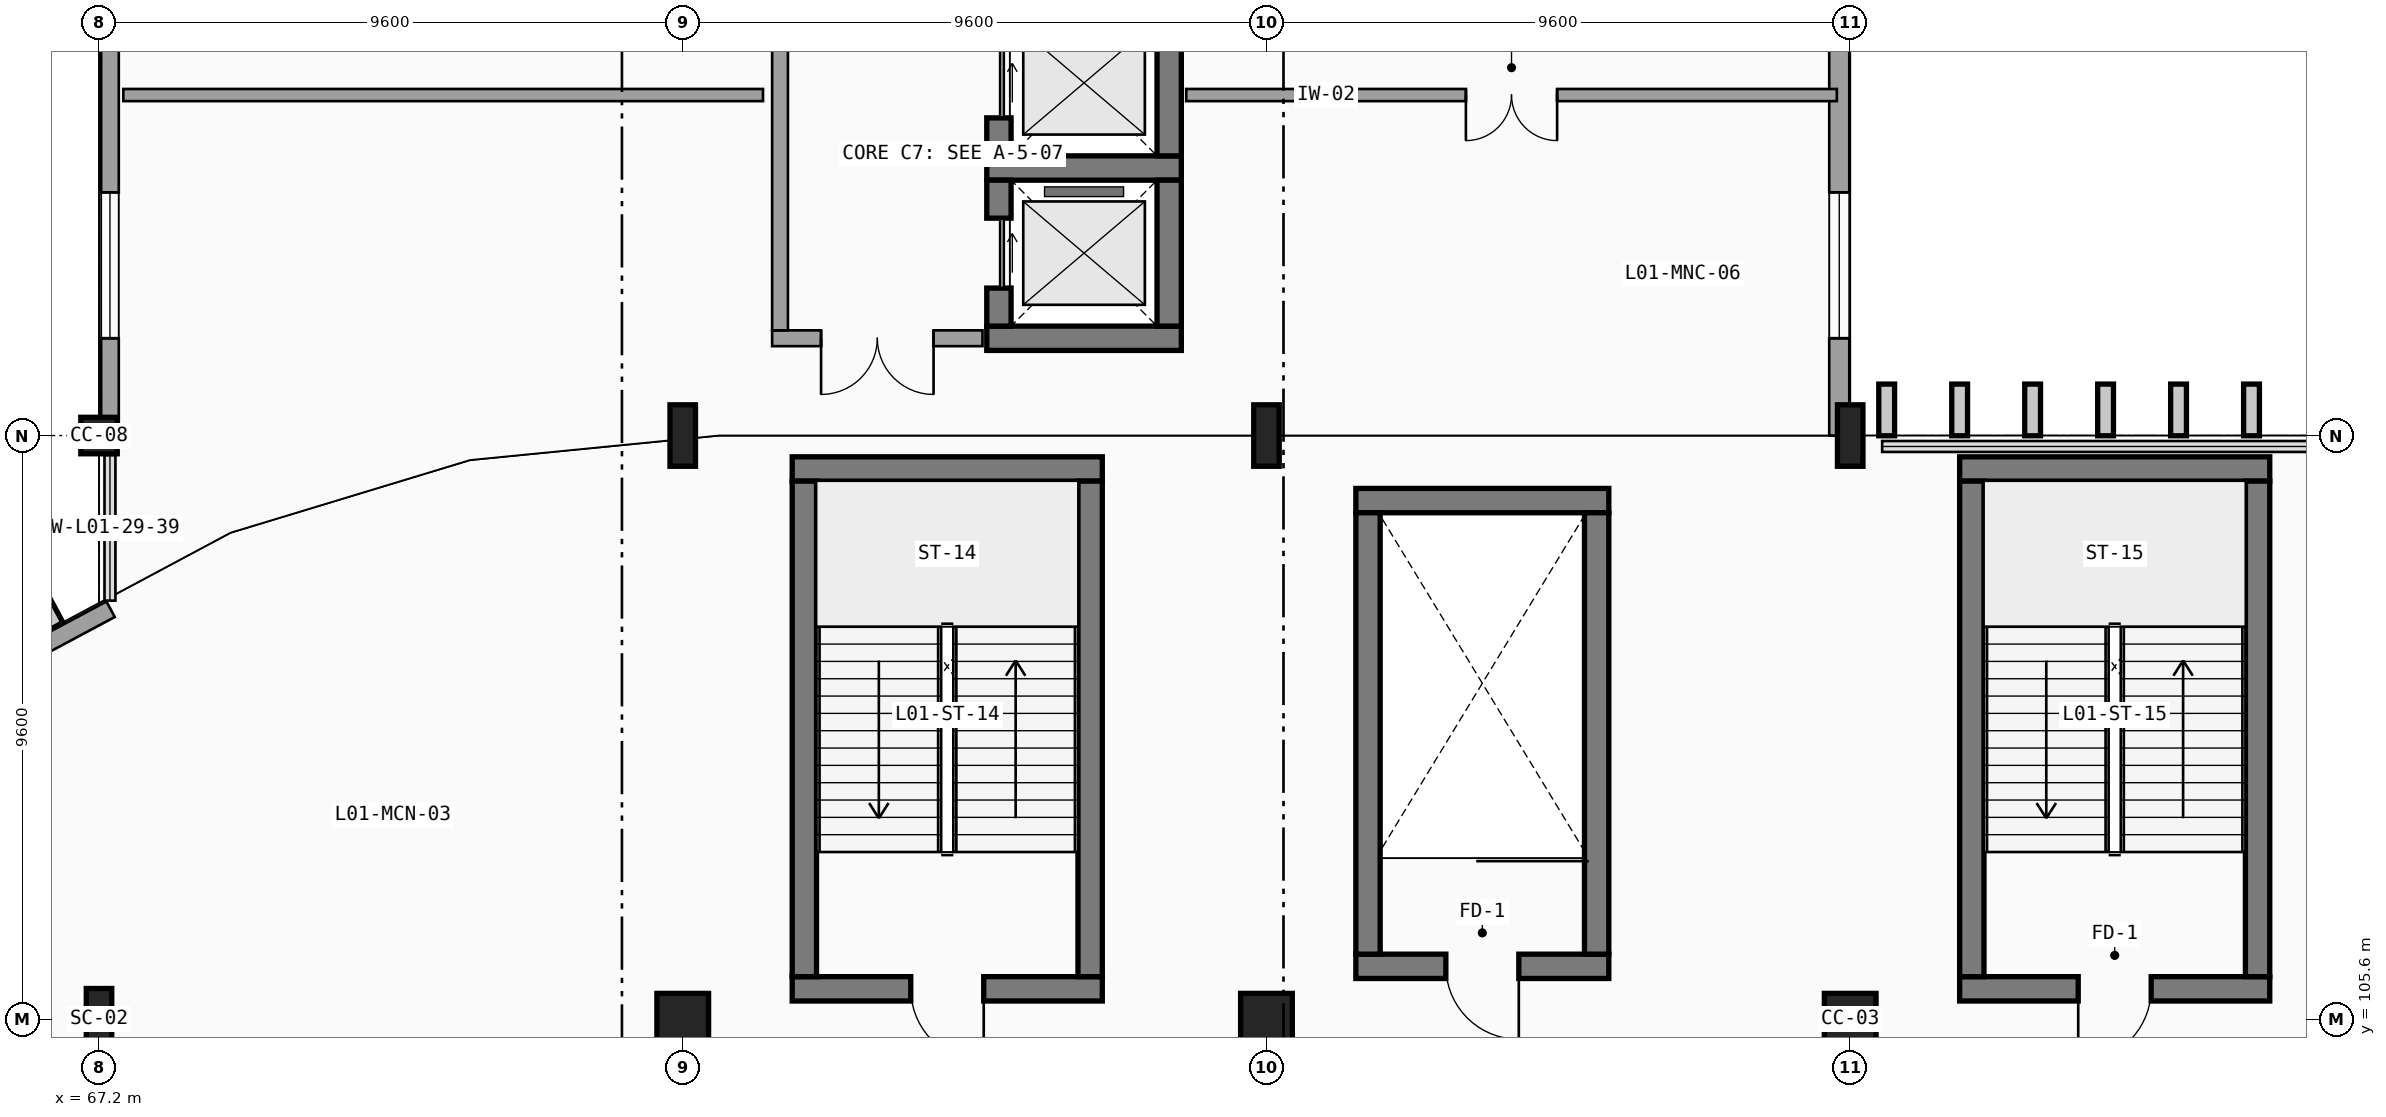
"""IFC4 building model, lengths in metres.
Left out: names, types, materials, properties, quantities, classifications, styles, units other than length and angle.
Written with IfcOpenShell. Run it as: python <this file> out.ifc"""

import sys

from ifc_helpers import new_model, si_unit, direction, frame, frame_2d, origin, origin_2d, place, context, subcontext, project, spatial, rectangle, i_section, extrude, element, fill, save


model = new_model("IFC4")
c1 = context("Model", 3, precision=1e-05, world=origin(), true_north=direction((0.0, 1.0)))
c2 = subcontext(c1, "Body", "Model", "MODEL_VIEW")
j1 = project(units=[si_unit("LENGTHUNIT", "METRE"), si_unit("PLANEANGLEUNIT", "RADIAN")], contexts=[c1])
p1 = place(None, origin())
s1 = spatial("IfcSite", under=j1, at=p1, CompositionType="ELEMENT")
p2 = place(p1, origin())
s2 = spatial("IfcBuilding", under=s1, at=p2, CompositionType="ELEMENT")
p3 = place(p2, frame((0.0, 0.0, 4.8)))
s3 = spatial("IfcBuildingStorey", under=s2, at=p3, CompositionType="ELEMENT", Elevation=4.8)
p4 = place(p3, frame((67.2, 105.6, 0.0), z_axis=(0.0, 0.0, 1.0), x_axis=(1.0, 0.0, 0.0)))
e1 = element("IfcColumn", 1, at=p4, inside=s3, PredefinedType="COLUMN", context=c2, shape_type="SweptSolid", body=[
    extrude(i_section(OverallWidth=0.419, OverallDepth=1.011, WebThickness=0.024, FlangeThickness=0.042, FilletRadius=0.031, at=origin_2d()), origin(), (0.0, 0.0, 1.0), 4.8),
])
p5 = place(p3, frame((67.2, 115.2, 0.0), z_axis=(0.0, 0.0, 1.0), x_axis=(1.0, 0.0, 0.0)))
e2 = element("IfcColumn", 2, at=p5, inside=s3, PredefinedType="COLUMN", context=c2, shape_type="SweptSolid", body=[
    extrude(rectangle(XDim=0.6, YDim=0.6, at=origin_2d()), origin(), (0.0, 0.0, 1.0), 4.8),
])
p6 = place(p3, frame((76.8, 105.6, 0.0), z_axis=(0.0, 0.0, 1.0), x_axis=(1.0, 0.0, 0.0)))
e3 = element("IfcColumn", 3, at=p6, inside=s3, PredefinedType="COLUMN", context=c2, shape_type="SweptSolid", body=[
    extrude(rectangle(XDim=0.85, YDim=0.85, at=origin_2d()), origin(), (0.0, 0.0, 1.0), 4.8),
])
p7 = place(p3, frame((76.8, 115.2, 0.0), z_axis=(0.0, 0.0, 1.0), x_axis=(1.0, 0.0, 0.0)))
e4 = element("IfcColumn", 4, at=p7, inside=s3, PredefinedType="COLUMN", context=c2, shape_type="SweptSolid", body=[
    extrude(i_section(OverallWidth=0.419, OverallDepth=1.011, WebThickness=0.024, FlangeThickness=0.042, FilletRadius=0.031, at=origin_2d()), origin(), (0.0, 0.0, 1.0), 4.8),
])
p8 = place(p3, frame((86.4, 105.6, 0.0), z_axis=(0.0, 0.0, 1.0), x_axis=(1.0, 0.0, 0.0)))
e5 = element("IfcColumn", 5, at=p8, inside=s3, PredefinedType="COLUMN", context=c2, shape_type="SweptSolid", body=[
    extrude(rectangle(XDim=0.85, YDim=0.85, at=origin_2d()), origin(), (0.0, 0.0, 1.0), 4.8),
])
p9 = place(p3, frame((86.4, 115.2, 0.0), z_axis=(0.0, 0.0, 1.0), x_axis=(1.0, 0.0, 0.0)))
e6 = element("IfcColumn", 6, at=p9, inside=s3, PredefinedType="COLUMN", context=c2, shape_type="SweptSolid", body=[
    extrude(i_section(OverallWidth=0.419, OverallDepth=1.011, WebThickness=0.024, FlangeThickness=0.042, FilletRadius=0.031, at=origin_2d()), origin(), (0.0, 0.0, 1.0), 4.8),
])
p10 = place(p3, frame((96.0, 105.6, 0.0), z_axis=(0.0, 0.0, 1.0), x_axis=(1.0, 0.0, 0.0)))
e7 = element("IfcColumn", 7, at=p10, inside=s3, PredefinedType="COLUMN", context=c2, shape_type="SweptSolid", body=[
    extrude(rectangle(XDim=0.85, YDim=0.85, at=origin_2d()), origin(), (0.0, 0.0, 1.0), 4.8),
])
p11 = place(p3, frame((96.0, 115.2, 0.0), z_axis=(0.0, 0.0, 1.0), x_axis=(1.0, 0.0, 0.0)))
e8 = element("IfcColumn", 8, at=p11, inside=s3, PredefinedType="COLUMN", context=c2, shape_type="SweptSolid", body=[
    extrude(i_section(OverallWidth=0.419, OverallDepth=1.011, WebThickness=0.024, FlangeThickness=0.042, FilletRadius=0.031, at=origin_2d()), origin(), (0.0, 0.0, 1.0), 4.8),
])
p12 = place(p3, frame((67.38, 124.8, 0.0), z_axis=(0.0, 0.0, 1.0), x_axis=(0.0, -1.0, 0.0)))
e9 = element("IfcWall", 9, at=p12, inside=s3, PredefinedType="SOLIDWALL", context=c2, shape_type="SweptSolid", body=[
    extrude(rectangle(XDim=9.6, YDim=0.29, at=frame_2d((4.8, 0.0))), origin(), (0.0, 0.0, 1.0), 3.913),
])
p13 = place(p12, frame((8.0, 0.0, 0.95), z_axis=(0.0, 0.0, 1.0), x_axis=(-1.0, 0.0, 0.0)))
e10 = element("IfcOpeningElement", 10, at=p13, cuts=e9, PredefinedType="OPENING", context=c2, shape_type="SweptSolid", body=[
    extrude(rectangle(XDim=2.4, YDim=2.2, at=frame_2d((1.2, 1.1))), frame((0.0, 0.155, 0.0), z_axis=(0.0, -1.0, 0.0), x_axis=(1.0, 0.0, 0.0)), (0.0, 0.0, 1.0), 0.31),
])
p14 = place(p3, frame((67.391, 112.343, 0.0), z_axis=(0.0, 0.0, 1.0), x_axis=(-0.881883861215, -0.47146670649, 0.0)))
e11 = element("IfcWall", 11, at=p14, inside=s3, PredefinedType="SOLIDWALL", context=c2, shape_type="SweptSolid", body=[
    extrude(rectangle(XDim=1.904, YDim=0.29, at=frame_2d((0.952, 0.0))), origin(), (0.0, 0.0, 1.0), 3.913),
])
p15 = place(p3, frame((95.82, 115.2, 0.0), z_axis=(0.0, 0.0, 1.0), x_axis=(0.0, 1.0, 0.0)))
e12 = element("IfcWall", 12, at=p15, inside=s3, PredefinedType="SOLIDWALL", context=c2, shape_type="SweptSolid", body=[
    extrude(rectangle(XDim=9.6, YDim=0.33, at=frame_2d((4.8, 0.0))), origin(), (0.0, 0.0, 1.0), 3.593),
])
p16 = place(p15, frame((4.0, 0.0, 0.95), z_axis=(0.0, 0.0, 1.0), x_axis=(-1.0, 0.0, 0.0)))
e13 = element("IfcOpeningElement", 13, at=p16, cuts=e12, PredefinedType="OPENING", context=c2, shape_type="SweptSolid", body=[
    extrude(rectangle(XDim=2.4, YDim=2.2, at=frame_2d((1.2, 1.1))), frame((0.0, 0.175, 0.0), z_axis=(0.0, -1.0, 0.0), x_axis=(1.0, 0.0, 0.0)), (0.0, 0.0, 1.0), 0.35),
])
for number, where, z_axis, x_axis in (
    (14, (81.8, 116.8, 0.0), (0.0, 0.0, 1.0), (1.0, 0.0, 0.0)),
    (15, (85.0, 119.6, 0.0), (0.0, 0.0, 1.0), (-1.0, 0.0, 0.0)),
):
    element("IfcWall", number, at=place(p3, frame(where, z_axis=z_axis, x_axis=x_axis)), inside=s3, PredefinedType="SHEAR", context=c2, shape_type="SweptSolid", body=[
        extrude(rectangle(XDim=3.2, YDim=0.4, at=frame_2d((1.6, 0.0))), origin(), (0.0, 0.0, 1.0), 4.52),
    ])
p17 = place(p3, frame((82.0, 119.4, 0.0), z_axis=(0.0, 0.0, 1.0), x_axis=(0.0, -1.0, 0.0)))
e16 = element("IfcWall", 16, at=p17, inside=s3, PredefinedType="SHEAR", context=c2, shape_type="SweptSolid", body=[
    extrude(rectangle(XDim=2.4, YDim=0.4, at=frame_2d((1.2, 0.0))), origin(), (0.0, 0.0, 1.0), 4.52),
])
p18 = place(p17, frame((0.625, 0.0, 0.0), z_axis=(0.0, 0.0, 1.0), x_axis=(1.0, 0.0, 0.0)))
e17 = element("IfcOpeningElement", 17, at=p18, cuts=e16, PredefinedType="OPENING", context=c2, shape_type="SweptSolid", body=[
    extrude(rectangle(XDim=1.15, YDim=2.2, at=frame_2d((0.575, 1.1))), frame((0.0, 0.21, 0.0), z_axis=(0.0, -1.0, 0.0), x_axis=(1.0, 0.0, 0.0)), (0.0, 0.0, 1.0), 0.42),
])
p19 = place(p3, frame((84.8, 117.0, 0.0), z_axis=(0.0, 0.0, 1.0), x_axis=(0.0, 1.0, 0.0)))
e18 = element("IfcWall", 18, at=p19, inside=s3, PredefinedType="SHEAR", context=c2, shape_type="SweptSolid", body=[
    extrude(rectangle(XDim=2.4, YDim=0.4, at=frame_2d((1.2, 0.0))), origin(), (0.0, 0.0, 1.0), 4.52),
])
p20 = place(p3, frame((82.0, 122.2, 0.0), z_axis=(0.0, 0.0, 1.0), x_axis=(0.0, -1.0, 0.0)))
e19 = element("IfcWall", 19, at=p20, inside=s3, PredefinedType="SHEAR", context=c2, shape_type="SweptSolid", body=[
    extrude(rectangle(XDim=2.4, YDim=0.4, at=frame_2d((1.2, 0.0))), origin(), (0.0, 0.0, 1.0), 4.52),
])
p21 = place(p20, frame((0.625, 0.0, 0.0), z_axis=(0.0, 0.0, 1.0), x_axis=(1.0, 0.0, 0.0)))
e20 = element("IfcOpeningElement", 20, at=p21, cuts=e19, PredefinedType="OPENING", context=c2, shape_type="SweptSolid", body=[
    extrude(rectangle(XDim=1.15, YDim=2.2, at=frame_2d((0.575, 1.1))), frame((0.0, 0.21, 0.0), z_axis=(0.0, -1.0, 0.0), x_axis=(1.0, 0.0, 0.0)), (0.0, 0.0, 1.0), 0.42),
])
p22 = place(p3, frame((84.8, 119.8, 0.0), z_axis=(0.0, 0.0, 1.0), x_axis=(0.0, 1.0, 0.0)))
e21 = element("IfcWall", 21, at=p22, inside=s3, PredefinedType="SHEAR", context=c2, shape_type="SweptSolid", body=[
    extrude(rectangle(XDim=2.4, YDim=0.4, at=frame_2d((1.2, 0.0))), origin(), (0.0, 0.0, 1.0), 4.52),
])
p23 = place(p3, frame((78.27, 116.8, 0.0), z_axis=(0.0, 0.0, 1.0), x_axis=(1.0, 0.0, 0.0)))
e22 = element("IfcWall", 22, at=p23, inside=s3, PredefinedType="SOLIDWALL", context=c2, shape_type="SweptSolid", body=[
    extrude(rectangle(XDim=3.46, YDim=0.26, at=frame_2d((1.73, 0.0))), origin(), (0.0, 0.0, 1.0), 4.52),
])
p24 = place(p23, frame((2.655, 0.0, 0.0), z_axis=(0.0, 0.0, 1.0), x_axis=(-1.0, 0.0, 0.0)))
e23 = element("IfcOpeningElement", 23, at=p24, cuts=e22, PredefinedType="OPENING", context=c2, shape_type="SweptSolid", body=[
    extrude(rectangle(XDim=1.85, YDim=2.25, at=frame_2d((0.925, 1.125))), frame((0.0, 0.14, 0.0), z_axis=(0.0, -1.0, 0.0), x_axis=(1.0, 0.0, 0.0)), (0.0, 0.0, 1.0), 0.28),
])
p25 = place(p3, frame((78.4, 122.27, 0.0), z_axis=(0.0, 0.0, 1.0), x_axis=(0.0, -1.0, 0.0)))
e24 = element("IfcWall", 24, at=p25, inside=s3, PredefinedType="SOLIDWALL", context=c2, shape_type="SweptSolid", body=[
    extrude(rectangle(XDim=5.34, YDim=0.26, at=frame_2d((2.67, 0.0))), origin(), (0.0, 0.0, 1.0), 4.52),
])
p26 = place(p3, frame((78.6, 106.1, 0.0), z_axis=(0.0, 0.0, 1.0), x_axis=(1.0, 0.0, 0.0)))
e25 = element("IfcWall", 25, at=p26, inside=s3, PredefinedType="SHEAR", context=c2, shape_type="SweptSolid", body=[
    extrude(rectangle(XDim=5.1, YDim=0.4, at=frame_2d((2.55, 0.0))), origin(), (0.0, 0.0, 1.0), 4.52),
])
p27 = place(p26, frame((3.15, 0.0, 0.0), z_axis=(0.0, 0.0, 1.0), x_axis=(-1.0, 0.0, 0.0)))
e26 = element("IfcOpeningElement", 26, at=p27, cuts=e25, PredefinedType="OPENING", context=c2, shape_type="SweptSolid", body=[
    extrude(rectangle(XDim=1.2, YDim=2.2, at=frame_2d((0.6, 1.1))), frame((0.0, 0.21, 0.0), z_axis=(0.0, -1.0, 0.0), x_axis=(1.0, 0.0, 0.0)), (0.0, 0.0, 1.0), 0.42),
])
p28 = place(p3, frame((83.7, 114.65, 0.0), z_axis=(0.0, 0.0, 1.0), x_axis=(-1.0, 0.0, 0.0)))
e27 = element("IfcWall", 27, at=p28, inside=s3, PredefinedType="SHEAR", context=c2, shape_type="SweptSolid", body=[
    extrude(rectangle(XDim=5.1, YDim=0.4, at=frame_2d((2.55, 0.0))), origin(), (0.0, 0.0, 1.0), 4.52),
])
for number, where, z_axis, x_axis in (
    (28, (78.8, 114.45, 0.0), (0.0, 0.0, 1.0), (0.0, -1.0, 0.0)),
    (29, (83.5, 106.3, 0.0), (0.0, 0.0, 1.0), (0.0, 1.0, 0.0)),
):
    element("IfcWall", number, at=place(p3, frame(where, z_axis=z_axis, x_axis=x_axis)), inside=s3, PredefinedType="SHEAR", context=c2, shape_type="SweptSolid", body=[
        extrude(rectangle(XDim=8.15, YDim=0.4, at=frame_2d((4.075, 0.0))), origin(), (0.0, 0.0, 1.0), 4.52),
    ])
p29 = place(p3, frame((97.8, 106.1, 0.0), z_axis=(0.0, 0.0, 1.0), x_axis=(1.0, 0.0, 0.0)))
e30 = element("IfcWall", 30, at=p29, inside=s3, PredefinedType="SHEAR", context=c2, shape_type="SweptSolid", body=[
    extrude(rectangle(XDim=5.1, YDim=0.4, at=frame_2d((2.55, 0.0))), origin(), (0.0, 0.0, 1.0), 4.52),
])
p30 = place(p29, frame((3.15, 0.0, 0.0), z_axis=(0.0, 0.0, 1.0), x_axis=(-1.0, 0.0, 0.0)))
e31 = element("IfcOpeningElement", 31, at=p30, cuts=e30, PredefinedType="OPENING", context=c2, shape_type="SweptSolid", body=[
    extrude(rectangle(XDim=1.2, YDim=2.2, at=frame_2d((0.6, 1.1))), frame((0.0, 0.21, 0.0), z_axis=(0.0, -1.0, 0.0), x_axis=(1.0, 0.0, 0.0)), (0.0, 0.0, 1.0), 0.42),
])
p31 = place(p3, frame((102.9, 114.65, 0.0), z_axis=(0.0, 0.0, 1.0), x_axis=(-1.0, 0.0, 0.0)))
e32 = element("IfcWall", 32, at=p31, inside=s3, PredefinedType="SHEAR", context=c2, shape_type="SweptSolid", body=[
    extrude(rectangle(XDim=5.1, YDim=0.4, at=frame_2d((2.55, 0.0))), origin(), (0.0, 0.0, 1.0), 4.52),
])
for number, where, z_axis, x_axis in (
    (33, (98.0, 114.45, 0.0), (0.0, 0.0, 1.0), (0.0, -1.0, 0.0)),
    (34, (102.7, 106.3, 0.0), (0.0, 0.0, 1.0), (0.0, 1.0, 0.0)),
):
    element("IfcWall", number, at=place(p3, frame(where, z_axis=z_axis, x_axis=x_axis)), inside=s3, PredefinedType="SHEAR", context=c2, shape_type="SweptSolid", body=[
        extrude(rectangle(XDim=8.15, YDim=0.4, at=frame_2d((4.075, 0.0))), origin(), (0.0, 0.0, 1.0), 4.52),
    ])
p32 = place(p3, frame((87.87, 106.47, 0.0), z_axis=(0.0, 0.0, 1.0), x_axis=(1.0, 0.0, 0.0)))
e35 = element("IfcWall", 35, at=p32, inside=s3, PredefinedType="SHEAR", context=c2, shape_type="SweptSolid", body=[
    extrude(rectangle(XDim=4.16, YDim=0.4, at=frame_2d((2.08, 0.0))), origin(), (0.0, 0.0, 1.0), 4.52),
])
p33 = place(p32, frame((2.68, 0.0, 0.0), z_axis=(0.0, 0.0, 1.0), x_axis=(-1.0, 0.0, 0.0)))
e36 = element("IfcOpeningElement", 36, at=p33, cuts=e35, PredefinedType="OPENING", context=c2, shape_type="SweptSolid", body=[
    extrude(rectangle(XDim=1.2, YDim=2.2, at=frame_2d((0.6, 1.1))), frame((0.0, 0.21, 0.0), z_axis=(0.0, -1.0, 0.0), x_axis=(1.0, 0.0, 0.0)), (0.0, 0.0, 1.0), 0.42),
])
p34 = place(p3, frame((92.03, 114.13, 0.0), z_axis=(0.0, 0.0, 1.0), x_axis=(-1.0, 0.0, 0.0)))
e37 = element("IfcWall", 37, at=p34, inside=s3, PredefinedType="SHEAR", context=c2, shape_type="SweptSolid", body=[
    extrude(rectangle(XDim=4.16, YDim=0.4, at=frame_2d((2.08, 0.0))), origin(), (0.0, 0.0, 1.0), 4.52),
])
for number, where, z_axis, x_axis in (
    (38, (88.07, 113.93, 0.0), (0.0, 0.0, 1.0), (0.0, -1.0, 0.0)),
    (39, (91.83, 106.67, 0.0), (0.0, 0.0, 1.0), (0.0, 1.0, 0.0)),
):
    element("IfcWall", number, at=place(p3, frame(where, z_axis=z_axis, x_axis=x_axis)), inside=s3, PredefinedType="SHEAR", context=c2, shape_type="SweptSolid", body=[
        extrude(rectangle(XDim=7.26, YDim=0.4, at=frame_2d((3.63, 0.0))), origin(), (0.0, 0.0, 1.0), 4.52),
    ])
p35 = place(p3, frame((95.78, 120.8, 0.0), z_axis=(0.0, 0.0, 1.0), x_axis=(-1.0, 0.0, 0.0)))
e40 = element("IfcWall", 40, at=p35, inside=s3, PredefinedType="PARTITIONING", context=c2, shape_type="SweptSolid", body=[
    extrude(rectangle(XDim=10.7, YDim=0.2, at=frame_2d((5.35, 0.0))), origin(), (0.0, 0.0, 1.0), 3.913),
])
p36 = place(p35, frame((4.6, 0.0, 0.0), z_axis=(0.0, 0.0, 1.0), x_axis=(1.0, 0.0, 0.0)))
e41 = element("IfcOpeningElement", 41, at=p36, cuts=e40, PredefinedType="OPENING", context=c2, shape_type="SweptSolid", body=[
    extrude(rectangle(XDim=1.5, YDim=2.25, at=frame_2d((0.75, 1.125))), frame((0.0, 0.11, 0.0), z_axis=(0.0, -1.0, 0.0), x_axis=(1.0, 0.0, 0.0)), (0.0, 0.0, 1.0), 0.22),
])
p37 = place(p3, frame((78.12, 120.8, 0.0), z_axis=(0.0, 0.0, 1.0), x_axis=(-1.0, 0.0, 0.0)))
e42 = element("IfcWall", 42, at=p37, inside=s3, PredefinedType="PARTITIONING", context=c2, shape_type="SweptSolid", body=[
    extrude(rectangle(XDim=10.52, YDim=0.2, at=frame_2d((5.26, 0.0))), origin(), (0.0, 0.0, 1.0), 3.913),
])
p38 = place(p13, origin())
e43 = element("IfcWindow", 43, at=p38, inside=s3, PartitioningType="SINGLE_PANEL", PredefinedType="WINDOW", context=c2, shape_type="SweptSolid", body=[
    extrude(rectangle(XDim=2.4, YDim=2.2, at=frame_2d((1.2, 1.1))), frame((0.0, 0.03, 0.0), z_axis=(0.0, -1.0, 0.0), x_axis=(1.0, 0.0, 0.0)), (0.0, 0.0, 1.0), 0.06),
])
fill(e10, e43)
p39 = place(p16, origin())
e44 = element("IfcWindow", 44, at=p39, inside=s3, PartitioningType="SINGLE_PANEL", PredefinedType="WINDOW", context=c2, shape_type="SweptSolid", body=[
    extrude(rectangle(XDim=2.4, YDim=2.2, at=frame_2d((1.2, 1.1))), frame((0.0, 0.03, 0.0), z_axis=(0.0, -1.0, 0.0), x_axis=(1.0, 0.0, 0.0)), (0.0, 0.0, 1.0), 0.06),
])
fill(e13, e44)
p40 = place(p18, origin())
e45 = element("IfcDoor", 45, at=p40, inside=s3, OperationType="SLIDING_TO_LEFT", PredefinedType="DOOR", context=c2, shape_type="SweptSolid", body=[
    extrude(rectangle(XDim=1.15, YDim=2.2, at=frame_2d((0.575, 1.1))), frame((0.0, 0.025, 0.0), z_axis=(0.0, -1.0, 0.0), x_axis=(1.0, 0.0, 0.0)), (0.0, 0.0, 1.0), 0.05),
])
fill(e17, e45)
p41 = place(p21, origin())
e46 = element("IfcDoor", 46, at=p41, inside=s3, OperationType="SLIDING_TO_LEFT", PredefinedType="DOOR", context=c2, shape_type="SweptSolid", body=[
    extrude(rectangle(XDim=1.15, YDim=2.2, at=frame_2d((0.575, 1.1))), frame((0.0, 0.025, 0.0), z_axis=(0.0, -1.0, 0.0), x_axis=(1.0, 0.0, 0.0)), (0.0, 0.0, 1.0), 0.05),
])
fill(e20, e46)
p42 = place(p24, origin())
e47 = element("IfcDoor", 47, at=p42, inside=s3, OperationType="DOUBLE_DOOR_SINGLE_SWING", PredefinedType="DOOR", context=c2, shape_type="SweptSolid", body=[
    extrude(rectangle(XDim=1.85, YDim=2.25, at=frame_2d((0.925, 1.125))), frame((0.0, 0.025, 0.0), z_axis=(0.0, -1.0, 0.0), x_axis=(1.0, 0.0, 0.0)), (0.0, 0.0, 1.0), 0.05),
])
fill(e23, e47)
p43 = place(p27, origin())
e48 = element("IfcDoor", 48, at=p43, inside=s3, OperationType="SINGLE_SWING_LEFT", PredefinedType="DOOR", context=c2, shape_type="SweptSolid", body=[
    extrude(rectangle(XDim=1.2, YDim=2.2, at=frame_2d((0.6, 1.1))), frame((0.0, 0.025, 0.0), z_axis=(0.0, -1.0, 0.0), x_axis=(1.0, 0.0, 0.0)), (0.0, 0.0, 1.0), 0.05),
])
fill(e26, e48)
p44 = place(p30, origin())
e49 = element("IfcDoor", 49, at=p44, inside=s3, OperationType="SINGLE_SWING_RIGHT", PredefinedType="DOOR", context=c2, shape_type="SweptSolid", body=[
    extrude(rectangle(XDim=1.2, YDim=2.2, at=frame_2d((0.6, 1.1))), frame((0.0, 0.025, 0.0), z_axis=(0.0, -1.0, 0.0), x_axis=(1.0, 0.0, 0.0)), (0.0, 0.0, 1.0), 0.05),
])
fill(e31, e49)
p45 = place(p33, origin())
e50 = element("IfcDoor", 50, at=p45, inside=s3, OperationType="SINGLE_SWING_LEFT", PredefinedType="DOOR", context=c2, shape_type="SweptSolid", body=[
    extrude(rectangle(XDim=1.2, YDim=2.2, at=frame_2d((0.6, 1.1))), frame((0.0, 0.025, 0.0), z_axis=(0.0, -1.0, 0.0), x_axis=(1.0, 0.0, 0.0)), (0.0, 0.0, 1.0), 0.05),
])
fill(e36, e50)
p46 = place(p36, origin())
e51 = element("IfcDoor", 51, at=p46, inside=s3, OperationType="DOUBLE_DOOR_SINGLE_SWING", PredefinedType="DOOR", context=c2, shape_type="SweptSolid", body=[
    extrude(rectangle(XDim=1.5, YDim=2.25, at=frame_2d((0.75, 1.125))), frame((0.0, 0.025, 0.0), z_axis=(0.0, -1.0, 0.0), x_axis=(1.0, 0.0, 0.0)), (0.0, 0.0, 1.0), 0.05),
])
fill(e41, e51)
save(model, sys.argv[1])
